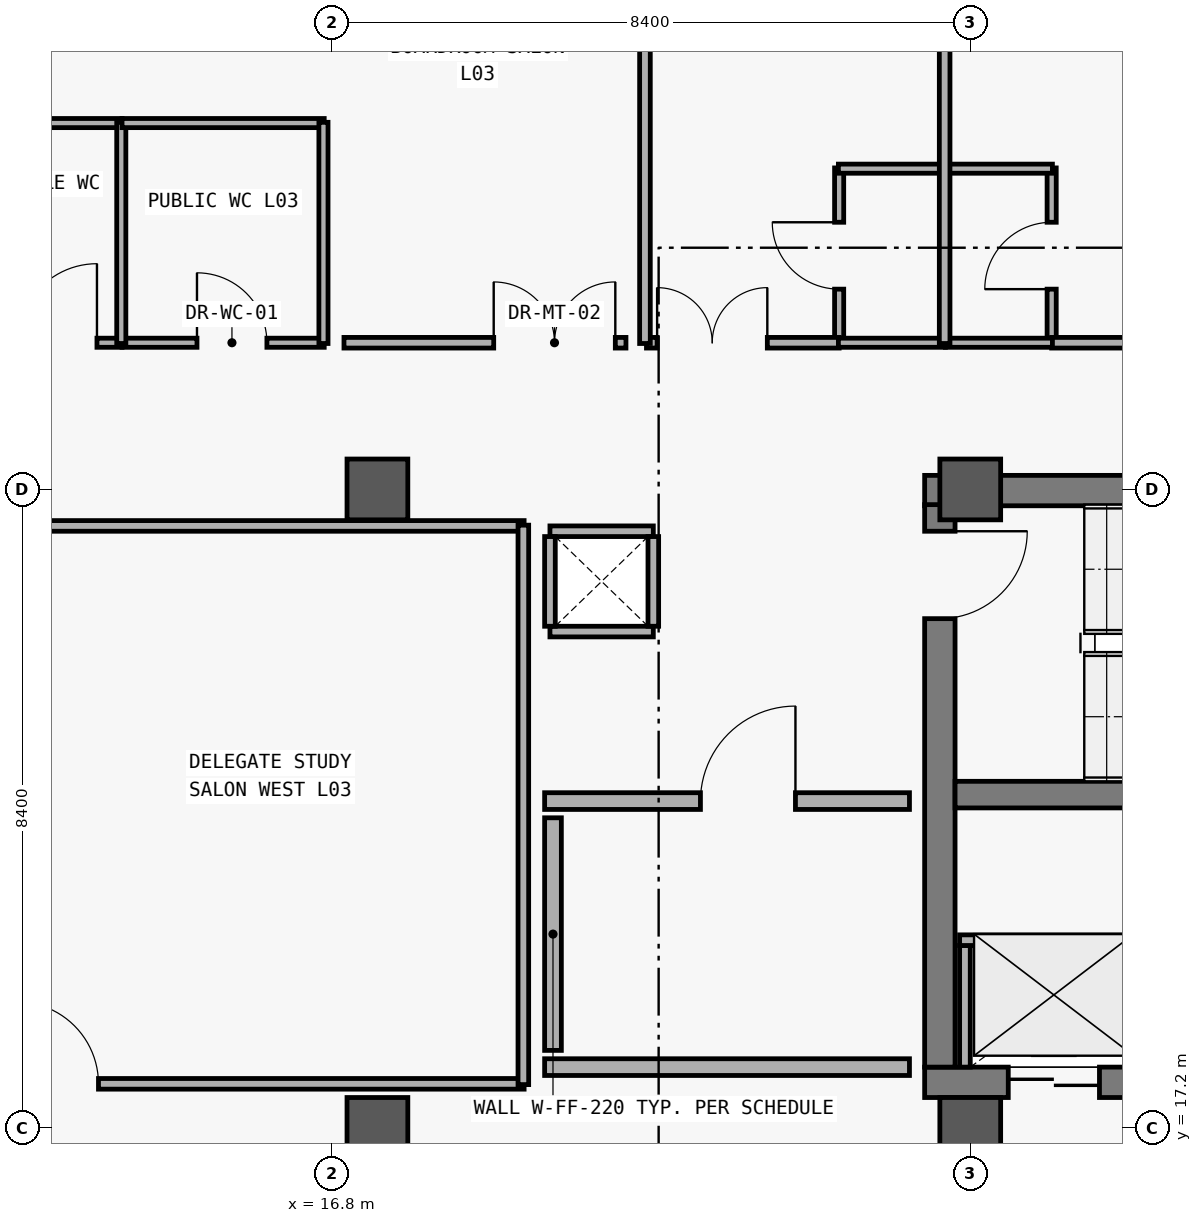
"""IFC4 building model, lengths in metres.
Left out: names, types, materials, properties, quantities, classifications, styles, units other than length and angle.
Written with IfcOpenShell. Run it as: python <this file> out.ifc"""

import sys

from ifc_helpers import new_model, si_unit, direction, frame, frame_2d, origin, origin_2d, place, context, subcontext, project, spatial, rectangle, extrude, element, fill, save


model = new_model("IFC4")
c1 = context("Model", 3, precision=1e-05, world=origin(), true_north=direction((0.0, 1.0)))
c2 = subcontext(c1, "Body", "Model", "MODEL_VIEW")
j1 = project(units=[si_unit("LENGTHUNIT", "METRE"), si_unit("PLANEANGLEUNIT", "RADIAN")], contexts=[c1])
p1 = place(None, origin())
s1 = spatial("IfcSite", under=j1, at=p1, CompositionType="ELEMENT")
p2 = place(p1, origin())
s2 = spatial("IfcBuilding", under=s1, at=p2, CompositionType="ELEMENT")
p3 = place(p2, frame((0.0, 0.0, 15.0)))
s3 = spatial("IfcBuildingStorey", under=s2, at=p3, CompositionType="ELEMENT", Elevation=15.0)
for number, where, z_axis, x_axis in (
    (1, (17.4, 17.2, 0.0), (0.0, 0.0, 1.0), (1.0, 0.0, 0.0)),
    (2, (17.4, 25.6, 0.0), (0.0, 0.0, 1.0), (1.0, 0.0, 0.0)),
    (3, (25.2, 17.2, 0.0), (0.0, 0.0, 1.0), (1.0, 0.0, 0.0)),
    (4, (25.2, 25.6, 0.0), (0.0, 0.0, 1.0), (1.0, 0.0, 0.0)),
):
    element("IfcColumn", number, at=place(p3, frame(where, z_axis=z_axis, x_axis=x_axis)), inside=s3, PredefinedType="COLUMN", context=c2, shape_type="SweptSolid", body=[
        extrude(rectangle(XDim=0.8, YDim=0.8, at=origin_2d()), origin(), (0.0, 0.0, 1.0), 4.2),
    ])
p4 = place(p3, frame((24.6, 17.8, 0.0), z_axis=(0.0, 0.0, 1.0), x_axis=(1.0, 0.0, 0.0)))
e5 = element("IfcWall", 5, at=p4, inside=s3, PredefinedType="SHEAR", context=c2, shape_type="SweptSolid", body=[
    extrude(rectangle(XDim=9.2, YDim=0.4, at=frame_2d((4.6, 0.0))), origin(), (0.0, 0.0, 1.0), 3.92),
])
p5 = place(p4, frame((1.1, 0.0, 0.0)))
e6 = element("IfcOpeningElement", 6, at=p5, cuts=e5, PredefinedType="OPENING", context=c2, shape_type="SweptSolid", body=[
    extrude(rectangle(XDim=1.2, YDim=2.2, at=frame_2d((0.6, 1.1))), frame((0.0, 0.21, 0.0), z_axis=(0.0, -1.0, 0.0), x_axis=(1.0, 0.0, 0.0)), (0.0, 0.0, 1.0), 0.42),
])
p6 = place(p4, frame((3.5, 0.0, 0.0)))
e7 = element("IfcOpeningElement", 7, at=p6, cuts=e5, PredefinedType="OPENING", context=c2, shape_type="SweptSolid", body=[
    extrude(rectangle(XDim=1.1, YDim=2.2, at=frame_2d((0.55, 1.1))), frame((0.0, 0.21, 0.0), z_axis=(0.0, -1.0, 0.0), x_axis=(1.0, 0.0, 0.0)), (0.0, 0.0, 1.0), 0.42),
])
p7 = place(p4, frame((5.9, 0.0, 0.0)))
e8 = element("IfcOpeningElement", 8, at=p7, cuts=e5, PredefinedType="OPENING", context=c2, shape_type="SweptSolid", body=[
    extrude(rectangle(XDim=1.1, YDim=2.2, at=frame_2d((0.55, 1.1))), frame((0.0, 0.21, 0.0), z_axis=(0.0, -1.0, 0.0), x_axis=(1.0, 0.0, 0.0)), (0.0, 0.0, 1.0), 0.42),
])
p8 = place(p3, frame((33.8, 25.585, 0.0), z_axis=(0.0, 0.0, 1.0), x_axis=(-1.0, 0.0, 0.0)))
e9 = element("IfcWall", 9, at=p8, inside=s3, PredefinedType="SHEAR", context=c2, shape_type="SweptSolid", body=[
    extrude(rectangle(XDim=9.2, YDim=0.4, at=frame_2d((4.6, 0.0))), origin(), (0.0, 0.0, 1.0), 3.92),
])
p9 = place(p3, frame((24.8, 25.4, 0.0), z_axis=(0.0, 0.0, 1.0), x_axis=(0.0, -1.0, 0.0)))
e10 = element("IfcWall", 10, at=p9, inside=s3, PredefinedType="SHEAR", context=c2, shape_type="SweptSolid", body=[
    extrude(rectangle(XDim=7.4, YDim=0.4, at=frame_2d((3.7, 0.0))), origin(), (0.0, 0.0, 1.0), 3.92),
])
p10 = place(p9, frame((0.35, 0.0, 0.0)))
e11 = element("IfcOpeningElement", 11, at=p10, cuts=e10, PredefinedType="OPENING", context=c2, shape_type="SweptSolid", body=[
    extrude(rectangle(XDim=1.15, YDim=2.2, at=frame_2d((0.575, 1.1))), frame((0.0, 0.21, 0.0), z_axis=(0.0, -1.0, 0.0), x_axis=(1.0, 0.0, 0.0)), (0.0, 0.0, 1.0), 0.42),
])
p11 = place(p3, frame((25.0, 21.585, 0.0), z_axis=(0.0, 0.0, 1.0), x_axis=(1.0, 0.0, 0.0)))
e12 = element("IfcWall", 12, at=p11, inside=s3, PredefinedType="SHEAR", context=c2, shape_type="SweptSolid", body=[
    extrude(rectangle(XDim=8.4, YDim=0.35, at=frame_2d((4.2, 0.0))), origin(), (0.0, 0.0, 1.0), 3.92),
])
p12 = place(p3, frame((25.13, 18.0, 0.0), z_axis=(0.0, 0.0, 1.0), x_axis=(0.0, 1.0, 0.0)))
e13 = element("IfcWall", 13, at=p12, inside=s3, PredefinedType="PARTITIONING", context=c2, shape_type="SweptSolid", body=[
    extrude(rectangle(XDim=1.6, YDim=0.14, at=frame_2d((0.8, 0.0))), origin(), (0.0, 0.0, 1.0), 3.07),
])
p13 = place(p3, frame((25.06, 19.67, 0.0), z_axis=(0.0, 0.0, 1.0), x_axis=(1.0, 0.0, 0.0)))
e14 = element("IfcWall", 14, at=p13, inside=s3, PredefinedType="PARTITIONING", context=c2, shape_type="SweptSolid", body=[
    extrude(rectangle(XDim=7.18, YDim=0.14, at=frame_2d((3.59, 0.0))), origin(), (0.0, 0.0, 1.0), 3.07),
])
p14 = place(p3, frame((19.6, 18.0, 0.0), z_axis=(0.0, 0.0, 1.0), x_axis=(1.0, 0.0, 0.0)))
e15 = element("IfcWall", 15, at=p14, inside=s3, PredefinedType="SOLIDWALL", context=c2, shape_type="SweptSolid", body=[
    extrude(rectangle(XDim=4.8, YDim=0.22, at=frame_2d((2.4, 0.0))), origin(), (0.0, 0.0, 1.0), 3.07),
])
p15 = place(p3, frame((19.6, 21.5, 0.0), z_axis=(0.0, 0.0, 1.0), x_axis=(1.0, 0.0, 0.0)))
e16 = element("IfcWall", 16, at=p15, inside=s3, PredefinedType="SOLIDWALL", context=c2, shape_type="SweptSolid", body=[
    extrude(rectangle(XDim=4.8, YDim=0.22, at=frame_2d((2.4, 0.0))), origin(), (0.0, 0.0, 1.0), 3.07),
])
p16 = place(p15, frame((2.05, 0.0, 0.0)))
e17 = element("IfcOpeningElement", 17, at=p16, cuts=e16, PredefinedType="OPENING", context=c2, shape_type="SweptSolid", body=[
    extrude(rectangle(XDim=1.25, YDim=2.2, at=frame_2d((0.625, 1.1))), frame((0.0, 0.12, 0.0), z_axis=(0.0, -1.0, 0.0), x_axis=(1.0, 0.0, 0.0)), (0.0, 0.0, 1.0), 0.24),
])
p17 = place(p3, frame((19.71, 18.22, 0.0), z_axis=(0.0, 0.0, 1.0), x_axis=(0.0, 1.0, 0.0)))
e18 = element("IfcWall", 18, at=p17, inside=s3, PredefinedType="SOLIDWALL", context=c2, shape_type="SweptSolid", body=[
    extrude(rectangle(XDim=3.06, YDim=0.22, at=frame_2d((1.53, 0.0))), origin(), (0.0, 0.0, 1.0), 3.07),
])
p18 = place(p3, frame((23.475, 27.52, 0.0), z_axis=(0.0, 0.0, 1.0), x_axis=(0.0, 1.0, 0.0)))
e19 = element("IfcWall", 19, at=p18, inside=s3, PredefinedType="PARTITIONING", context=c2, shape_type="SweptSolid", body=[
    extrude(rectangle(XDim=2.31, YDim=0.12, at=frame_2d((1.155, 0.0))), origin(), (0.0, 0.0, 1.0), 3.02),
])
p19 = place(p18, frame((0.715, 0.0, 0.0)))
e20 = element("IfcOpeningElement", 20, at=p19, cuts=e19, PredefinedType="OPENING", context=c2, shape_type="SweptSolid", body=[
    extrude(rectangle(XDim=0.88, YDim=2.15, at=frame_2d((0.44, 1.075))), frame((0.0, 0.07, 0.0), z_axis=(0.0, -1.0, 0.0), x_axis=(1.0, 0.0, 0.0)), (0.0, 0.0, 1.0), 0.14),
])
p20 = place(p3, frame((26.271, 27.52, 0.0), z_axis=(0.0, 0.0, 1.0), x_axis=(0.0, 1.0, 0.0)))
e21 = element("IfcWall", 21, at=p20, inside=s3, PredefinedType="PARTITIONING", context=c2, shape_type="SweptSolid", body=[
    extrude(rectangle(XDim=2.31, YDim=0.12, at=frame_2d((1.155, 0.0))), origin(), (0.0, 0.0, 1.0), 3.02),
])
p21 = place(p20, frame((0.715, 0.0, 0.0)))
e22 = element("IfcOpeningElement", 22, at=p21, cuts=e21, PredefinedType="OPENING", context=c2, shape_type="SweptSolid", body=[
    extrude(rectangle(XDim=0.88, YDim=2.15, at=frame_2d((0.44, 1.075))), frame((0.0, 0.07, 0.0), z_axis=(0.0, -1.0, 0.0), x_axis=(1.0, 0.0, 0.0)), (0.0, 0.0, 1.0), 0.14),
])
p22 = place(p3, frame((11.48, 27.53, 0.0), z_axis=(0.0, 0.0, 1.0), x_axis=(1.0, 0.0, 0.0)))
e23 = element("IfcWall", 23, at=p22, inside=s3, PredefinedType="PARTITIONING", context=c2, shape_type="SweptSolid", body=[
    extrude(rectangle(XDim=2.56, YDim=0.12, at=frame_2d((1.28, 0.0))), origin(), (0.0, 0.0, 1.0), 3.02),
])
p23 = place(p22, frame((1.19, 0.0, 0.0)))
e24 = element("IfcOpeningElement", 24, at=p23, cuts=e23, PredefinedType="OPENING", context=c2, shape_type="SweptSolid", body=[
    extrude(rectangle(XDim=1.04, YDim=2.15, at=frame_2d((0.52, 1.075))), frame((0.0, 0.07, 0.0), z_axis=(0.0, -1.0, 0.0), x_axis=(1.0, 0.0, 0.0)), (0.0, 0.0, 1.0), 0.14),
])
p24 = place(p3, frame((14.04, 27.53, 0.0), z_axis=(0.0, 0.0, 1.0), x_axis=(1.0, 0.0, 0.0)))
e25 = element("IfcWall", 25, at=p24, inside=s3, PredefinedType="PARTITIONING", context=c2, shape_type="SweptSolid", body=[
    extrude(rectangle(XDim=2.66, YDim=0.12, at=frame_2d((1.33, 0.0))), origin(), (0.0, 0.0, 1.0), 3.02),
])
p25 = place(p24, frame((0.986, 0.0, 0.0)))
e26 = element("IfcOpeningElement", 26, at=p25, cuts=e25, PredefinedType="OPENING", context=c2, shape_type="SweptSolid", body=[
    extrude(rectangle(XDim=0.92, YDim=2.15, at=frame_2d((0.46, 1.075))), frame((0.0, 0.07, 0.0), z_axis=(0.0, -1.0, 0.0), x_axis=(1.0, 0.0, 0.0)), (0.0, 0.0, 1.0), 0.14),
])
p26 = place(p3, frame((8.68, 17.78, 0.0), z_axis=(0.0, 0.0, 1.0), x_axis=(1.0, 0.0, 0.0)))
e27 = element("IfcWall", 27, at=p26, inside=s3, PredefinedType="PARTITIONING", context=c2, shape_type="SweptSolid", body=[
    extrude(rectangle(XDim=10.65, YDim=0.14, at=frame_2d((5.325, 0.0))), origin(), (0.0, 0.0, 1.0), 3.02),
])
p27 = place(p26, frame((3.97, 0.0, 0.0)))
e28 = element("IfcOpeningElement", 28, at=p27, cuts=e27, PredefinedType="OPENING", context=c2, shape_type="SweptSolid", body=[
    extrude(rectangle(XDim=1.08, YDim=2.25, at=frame_2d((0.54, 1.125))), frame((0.0, 0.08, 0.0), z_axis=(0.0, -1.0, 0.0), x_axis=(1.0, 0.0, 0.0)), (0.0, 0.0, 1.0), 0.16),
])
p28 = place(p3, frame((16.96, 27.53, 0.0), z_axis=(0.0, 0.0, 1.0), x_axis=(1.0, 0.0, 0.0)))
e29 = element("IfcWall", 29, at=p28, inside=s3, PredefinedType="PARTITIONING", context=c2, shape_type="SweptSolid", body=[
    extrude(rectangle(XDim=3.71, YDim=0.14, at=frame_2d((1.855, 0.0))), origin(), (0.0, 0.0, 1.0), 3.02),
])
p29 = place(p28, frame((1.97, 0.0, 0.0)))
e30 = element("IfcOpeningElement", 30, at=p29, cuts=e29, PredefinedType="OPENING", context=c2, shape_type="SweptSolid", body=[
    extrude(rectangle(XDim=1.6, YDim=2.3, at=frame_2d((0.8, 1.15))), frame((0.0, 0.08, 0.0), z_axis=(0.0, -1.0, 0.0), x_axis=(1.0, 0.0, 0.0)), (0.0, 0.0, 1.0), 0.16),
])
p30 = place(p3, frame((20.94, 27.53, 0.0), z_axis=(0.0, 0.0, 1.0), x_axis=(1.0, 0.0, 0.0)))
e31 = element("IfcWall", 31, at=p30, inside=s3, PredefinedType="PARTITIONING", context=c2, shape_type="SweptSolid", body=[
    extrude(rectangle(XDim=2.535, YDim=0.14, at=frame_2d((1.268, 0.0))), origin(), (0.0, 0.0, 1.0), 3.02),
])
p31 = place(p30, frame((0.14, 0.0, 0.0)))
e32 = element("IfcOpeningElement", 32, at=p31, cuts=e31, PredefinedType="OPENING", context=c2, shape_type="SweptSolid", body=[
    extrude(rectangle(XDim=1.45, YDim=2.3, at=frame_2d((0.725, 1.15))), frame((0.0, 0.08, 0.0), z_axis=(0.0, -1.0, 0.0), x_axis=(1.0, 0.0, 0.0)), (0.0, 0.0, 1.0), 0.16),
])
p32 = place(p3, frame((26.271, 27.53, 0.0), z_axis=(0.0, 0.0, 1.0), x_axis=(1.0, 0.0, 0.0)))
e33 = element("IfcWall", 33, at=p32, inside=s3, PredefinedType="PARTITIONING", context=c2, shape_type="SweptSolid", body=[
    extrude(rectangle(XDim=2.535, YDim=0.14, at=frame_2d((1.268, 0.0))), origin(), (0.0, 0.0, 1.0), 3.02),
])
p33 = place(p32, frame((1.408, 0.0, 0.0)))
e34 = element("IfcOpeningElement", 34, at=p33, cuts=e33, PredefinedType="OPENING", context=c2, shape_type="SweptSolid", body=[
    extrude(rectangle(XDim=0.94, YDim=2.2, at=frame_2d((0.47, 1.1))), frame((0.0, 0.08, 0.0), z_axis=(0.0, -1.0, 0.0), x_axis=(1.0, 0.0, 0.0)), (0.0, 0.0, 1.0), 0.16),
])
for number, where, z_axis, x_axis in (
    (35, (23.465, 27.53, 0.0), (0.0, 0.0, 1.0), (1.0, 0.0, 0.0)),
    (36, (23.465, 29.82, 0.0), (0.0, 0.0, 1.0), (1.0, 0.0, 0.0)),
    (37, (24.873, 27.53, 0.0), (0.0, 0.0, 1.0), (1.0, 0.0, 0.0)),
    (38, (24.873, 29.82, 0.0), (0.0, 0.0, 1.0), (1.0, 0.0, 0.0)),
):
    element("IfcWall", number, at=place(p3, frame(where, z_axis=z_axis, x_axis=x_axis)), inside=s3, PredefinedType="PARTITIONING", context=c2, shape_type="SweptSolid", body=[
        extrude(rectangle(XDim=1.408, YDim=0.12, at=frame_2d((0.704, 0.0))), origin(), (0.0, 0.0, 1.0), 3.02),
    ])
p34 = place(p3, frame((11.48, 30.42, 0.0), z_axis=(0.0, 0.0, 1.0), x_axis=(1.0, 0.0, 0.0)))
e39 = element("IfcWall", 39, at=p34, inside=s3, PredefinedType="PARTITIONING", context=c2, shape_type="SweptSolid", body=[
    extrude(rectangle(XDim=2.56, YDim=0.12, at=frame_2d((1.28, 0.0))), origin(), (0.0, 0.0, 1.0), 3.02),
])
p35 = place(p3, frame((14.03, 27.52, 0.0), z_axis=(0.0, 0.0, 1.0), x_axis=(0.0, 1.0, 0.0)))
e40 = element("IfcWall", 40, at=p35, inside=s3, PredefinedType="PARTITIONING", context=c2, shape_type="SweptSolid", body=[
    extrude(rectangle(XDim=2.91, YDim=0.12, at=frame_2d((1.455, 0.0))), origin(), (0.0, 0.0, 1.0), 3.02),
])
p36 = place(p3, frame((14.04, 30.42, 0.0), z_axis=(0.0, 0.0, 1.0), x_axis=(1.0, 0.0, 0.0)))
e41 = element("IfcWall", 41, at=p36, inside=s3, PredefinedType="PARTITIONING", context=c2, shape_type="SweptSolid", body=[
    extrude(rectangle(XDim=2.66, YDim=0.12, at=frame_2d((1.33, 0.0))), origin(), (0.0, 0.0, 1.0), 3.02),
])
p37 = place(p3, frame((16.69, 27.52, 0.0), z_axis=(0.0, 0.0, 1.0), x_axis=(0.0, 1.0, 0.0)))
e42 = element("IfcWall", 42, at=p37, inside=s3, PredefinedType="PARTITIONING", context=c2, shape_type="SweptSolid", body=[
    extrude(rectangle(XDim=2.91, YDim=0.12, at=frame_2d((1.455, 0.0))), origin(), (0.0, 0.0, 1.0), 3.02),
])
p38 = place(p3, frame((8.68, 25.12, 0.0), z_axis=(0.0, 0.0, 1.0), x_axis=(1.0, 0.0, 0.0)))
e43 = element("IfcWall", 43, at=p38, inside=s3, PredefinedType="PARTITIONING", context=c2, shape_type="SweptSolid", body=[
    extrude(rectangle(XDim=10.65, YDim=0.14, at=frame_2d((5.325, 0.0))), origin(), (0.0, 0.0, 1.0), 3.02),
])
p39 = place(p3, frame((19.32, 17.77, 0.0), z_axis=(0.0, 0.0, 1.0), x_axis=(0.0, 1.0, 0.0)))
e44 = element("IfcWall", 44, at=p39, inside=s3, PredefinedType="PARTITIONING", context=c2, shape_type="SweptSolid", body=[
    extrude(rectangle(XDim=7.36, YDim=0.14, at=frame_2d((3.68, 0.0))), origin(), (0.0, 0.0, 1.0), 3.02),
])
for number, where, z_axis, x_axis in (
    (45, (20.92, 27.52, 0.0), (0.0, 0.0, 1.0), (0.0, 1.0, 0.0)),
    (46, (24.863, 27.52, 0.0), (0.0, 0.0, 1.0), (0.0, 1.0, 0.0)),
):
    element("IfcWall", number, at=place(p3, frame(where, z_axis=z_axis, x_axis=x_axis)), inside=s3, PredefinedType="PARTITIONING", context=c2, shape_type="SweptSolid", body=[
        extrude(rectangle(XDim=6.2, YDim=0.14, at=frame_2d((3.1, 0.0))), origin(), (0.0, 0.0, 1.0), 3.02),
    ])
for number, where, z_axis, x_axis in (
    (47, (19.67, 23.73, 0.0), (0.0, 0.0, 1.0), (1.0, 0.0, 0.0)),
    (48, (21.03, 25.05, 0.0), (0.0, 0.0, 1.0), (-1.0, 0.0, 0.0)),
):
    element("IfcWall", number, at=place(p3, frame(where, z_axis=z_axis, x_axis=x_axis)), inside=s3, PredefinedType="PARTITIONING", context=c2, shape_type="SweptSolid", body=[
        extrude(rectangle(XDim=1.36, YDim=0.14, at=frame_2d((0.68, 0.0))), origin(), (0.0, 0.0, 1.0), 3.04),
    ])
for number, where, z_axis, x_axis in (
    (49, (19.67, 24.98, 0.0), (0.0, 0.0, 1.0), (0.0, -1.0, 0.0)),
    (50, (21.03, 23.8, 0.0), (0.0, 0.0, 1.0), (0.0, 1.0, 0.0)),
):
    element("IfcWall", number, at=place(p3, frame(where, z_axis=z_axis, x_axis=x_axis)), inside=s3, PredefinedType="PARTITIONING", context=c2, shape_type="SweptSolid", body=[
        extrude(rectangle(XDim=1.18, YDim=0.14, at=frame_2d((0.59, 0.0))), origin(), (0.0, 0.0, 1.0), 3.04),
    ])
p40 = place(p10, origin())
e51 = element("IfcDoor", 51, at=p40, inside=s3, OperationType="SINGLE_SWING_LEFT", PredefinedType="DOOR", context=c2, shape_type="SweptSolid", body=[
    extrude(rectangle(XDim=1.15, YDim=2.2, at=frame_2d((0.575, 1.1))), frame((0.0, 0.025, 0.0), z_axis=(0.0, -1.0, 0.0), x_axis=(1.0, 0.0, 0.0)), (0.0, 0.0, 1.0), 0.05),
])
fill(e11, e51)
p41 = place(p5, origin())
e52 = element("IfcDoor", 52, at=p41, inside=s3, OperationType="DOUBLE_DOOR_SLIDING", PredefinedType="DOOR", context=c2, shape_type="SweptSolid", body=[
    extrude(rectangle(XDim=1.2, YDim=2.2, at=frame_2d((0.6, 1.1))), frame((0.0, 0.025, 0.0), z_axis=(0.0, -1.0, 0.0), x_axis=(1.0, 0.0, 0.0)), (0.0, 0.0, 1.0), 0.05),
])
fill(e6, e52)
p42 = place(p16, origin())
e53 = element("IfcDoor", 53, at=p42, inside=s3, OperationType="SINGLE_SWING_RIGHT", PredefinedType="DOOR", context=c2, shape_type="SweptSolid", body=[
    extrude(rectangle(XDim=1.25, YDim=2.2, at=frame_2d((0.625, 1.1))), frame((0.0, 0.025, 0.0), z_axis=(0.0, -1.0, 0.0), x_axis=(1.0, 0.0, 0.0)), (0.0, 0.0, 1.0), 0.05),
])
fill(e17, e53)
p43 = place(p19, origin())
e54 = element("IfcDoor", 54, at=p43, inside=s3, OperationType="SINGLE_SWING_RIGHT", PredefinedType="DOOR", context=c2, shape_type="SweptSolid", body=[
    extrude(rectangle(XDim=0.88, YDim=2.15, at=frame_2d((0.44, 1.075))), frame((0.0, 0.025, 0.0), z_axis=(0.0, -1.0, 0.0), x_axis=(1.0, 0.0, 0.0)), (0.0, 0.0, 1.0), 0.05),
])
fill(e20, e54)
p44 = place(p21, origin())
e55 = element("IfcDoor", 55, at=p44, inside=s3, OperationType="SINGLE_SWING_LEFT", PredefinedType="DOOR", context=c2, shape_type="SweptSolid", body=[
    extrude(rectangle(XDim=0.88, YDim=2.15, at=frame_2d((0.44, 1.075))), frame((0.0, 0.025, 0.0), z_axis=(0.0, -1.0, 0.0), x_axis=(1.0, 0.0, 0.0)), (0.0, 0.0, 1.0), 0.05),
])
fill(e22, e55)
p45 = place(p23, origin())
e56 = element("IfcDoor", 56, at=p45, inside=s3, OperationType="SINGLE_SWING_RIGHT", PredefinedType="DOOR", context=c2, shape_type="SweptSolid", body=[
    extrude(rectangle(XDim=1.04, YDim=2.15, at=frame_2d((0.52, 1.075))), frame((0.0, 0.025, 0.0), z_axis=(0.0, -1.0, 0.0), x_axis=(1.0, 0.0, 0.0)), (0.0, 0.0, 1.0), 0.05),
])
fill(e24, e56)
p46 = place(p25, origin())
e57 = element("IfcDoor", 57, at=p46, inside=s3, OperationType="SINGLE_SWING_LEFT", PredefinedType="DOOR", context=c2, shape_type="SweptSolid", body=[
    extrude(rectangle(XDim=0.92, YDim=2.15, at=frame_2d((0.46, 1.075))), frame((0.0, 0.025, 0.0), z_axis=(0.0, -1.0, 0.0), x_axis=(1.0, 0.0, 0.0)), (0.0, 0.0, 1.0), 0.05),
])
fill(e26, e57)
p47 = place(p27, origin())
e58 = element("IfcDoor", 58, at=p47, inside=s3, OperationType="SINGLE_SWING_LEFT", PredefinedType="DOOR", context=c2, shape_type="SweptSolid", body=[
    extrude(rectangle(XDim=1.08, YDim=2.25, at=frame_2d((0.54, 1.125))), frame((0.0, 0.025, 0.0), z_axis=(0.0, -1.0, 0.0), x_axis=(1.0, 0.0, 0.0)), (0.0, 0.0, 1.0), 0.05),
])
fill(e28, e58)
p48 = place(p29, origin())
e59 = element("IfcDoor", 59, at=p48, inside=s3, OperationType="DOUBLE_DOOR_SINGLE_SWING", PredefinedType="DOOR", context=c2, shape_type="SweptSolid", body=[
    extrude(rectangle(XDim=1.6, YDim=2.3, at=frame_2d((0.8, 1.15))), frame((0.0, 0.025, 0.0), z_axis=(0.0, -1.0, 0.0), x_axis=(1.0, 0.0, 0.0)), (0.0, 0.0, 1.0), 0.05),
])
fill(e30, e59)
p49 = place(p31, origin())
e60 = element("IfcDoor", 60, at=p49, inside=s3, OperationType="DOUBLE_DOOR_SINGLE_SWING", PredefinedType="DOOR", context=c2, shape_type="SweptSolid", body=[
    extrude(rectangle(XDim=1.45, YDim=2.3, at=frame_2d((0.725, 1.15))), frame((0.0, 0.025, 0.0), z_axis=(0.0, -1.0, 0.0), x_axis=(1.0, 0.0, 0.0)), (0.0, 0.0, 1.0), 0.05),
])
fill(e32, e60)
save(model, sys.argv[1])
